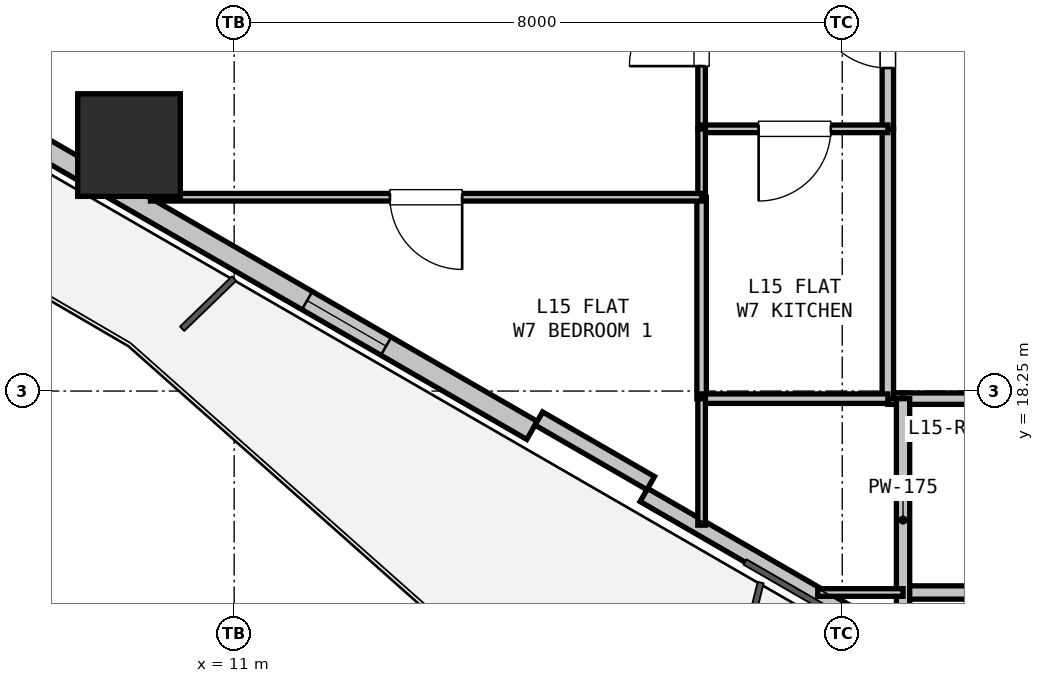
"""IFC4 building model, lengths in metres.
Left out: names, types, materials, properties, quantities, classifications, styles, units other than length and angle.
Written with IfcOpenShell. Run it as: python <this file> out.ifc"""

import sys

from ifc_helpers import new_model, si_unit, direction, frame, frame_2d, origin, origin_2d, place, context, subcontext, project, spatial, rectangle, hollow_rectangle, extrude, element, fill, save


model = new_model("IFC4")
c1 = context("Model", 3, precision=1e-05, world=origin(), true_north=direction((0.0, 1.0)))
c2 = subcontext(c1, "Body", "Model", "MODEL_VIEW")
j1 = project(units=[si_unit("LENGTHUNIT", "METRE"), si_unit("PLANEANGLEUNIT", "RADIAN")], contexts=[c1])
p1 = place(None, origin())
s1 = spatial("IfcSite", under=j1, at=p1, CompositionType="ELEMENT")
p2 = place(p1, origin())
s2 = spatial("IfcBuilding", under=s1, at=p2, CompositionType="ELEMENT")
p3 = place(p2, frame((0.0, 0.0, 55.5)))
s3 = spatial("IfcBuildingStorey", under=s2, at=p3, CompositionType="ELEMENT", Elevation=55.5)
p4 = place(p3, frame((9.617, 21.486, 0.0), z_axis=(0.0, 0.0, 1.0), x_axis=(1.0, 0.0, 0.0)))
e1 = element("IfcColumn", 1, at=p4, inside=s3, PredefinedType="COLUMN", context=c2, shape_type="SweptSolid", body=[
    extrude(hollow_rectangle(XDim=1.35, YDim=1.35, WallThickness=0.036, at=origin_2d()), origin(), (0.0, 0.0, 1.0), 3.3),
])
p5 = place(p3, frame((26.76, 10.896, 0.0), z_axis=(0.0, 0.0, 1.0), x_axis=(-0.866027351828, 0.499996625875, 0.0)))
e2 = element("IfcWall", 2, at=p5, inside=s3, PredefinedType="PARAPET", context=c2, shape_type="SweptSolid", body=[
    extrude(rectangle(XDim=11.973, YDim=0.2, at=frame_2d((5.987, 0.0))), origin(), (0.0, 0.0, 1.0), 0.2),
])
p6 = place(p3, frame((14.918, 17.733, 0.0), z_axis=(0.0, 0.0, 1.0), x_axis=(-0.866027105532, 0.499997052475, 0.0)))
e3 = element("IfcWall", 3, at=p6, inside=s3, PredefinedType="SOLIDWALL", context=c2, shape_type="SweptSolid", body=[
    extrude(rectangle(XDim=12.673, YDim=0.275, at=frame_2d((6.336, 0.0))), origin(), (0.0, 0.0, 1.0), 2.66),
])
p7 = place(p6, frame((2.216, 0.0, 0.9)))
e4 = element("IfcOpeningElement", 4, at=p7, cuts=e3, PredefinedType="OPENING", context=c2, shape_type="SweptSolid", body=[
    extrude(rectangle(XDim=1.2, YDim=1.4, at=frame_2d((0.6, 0.7))), frame((0.0, 0.147, 0.0), z_axis=(0.0, -1.0, 0.0), x_axis=(1.0, 0.0, 0.0)), (0.0, 0.0, 1.0), 0.295),
])
p8 = place(p3, frame((16.48, 17.039, 0.0), z_axis=(0.0, 0.0, 1.0), x_axis=(-0.86605165483, 0.499954529098, 0.0)))
e5 = element("IfcWall", 5, at=p8, inside=s3, PredefinedType="PARAPET", context=c2, shape_type="SweptSolid", body=[
    extrude(rectangle(XDim=1.7, YDim=0.2, at=frame_2d((0.85, 0.0))), origin(), (0.0, 0.0, 1.0), 2.66),
])
p9 = place(p3, frame((21.8, 18.15, 0.0), z_axis=(0.0, 0.0, 1.0), x_axis=(-1.0, 0.0, 0.0)))
e6 = element("IfcWall", 6, at=p9, inside=s3, PredefinedType="PARTITIONING", context=c2, shape_type="SweptSolid", body=[
    extrude(rectangle(XDim=2.0, YDim=0.15, at=frame_2d((1.0, 0.0))), origin(), (0.0, 0.0, 1.0), 3.04),
])
p10 = place(p3, frame((19.8, 18.15, 0.0), z_axis=(0.0, 0.0, 1.0), x_axis=(-1.0, 0.0, 0.0)))
e7 = element("IfcWall", 7, at=p10, inside=s3, PredefinedType="PARTITIONING", context=c2, shape_type="SweptSolid", body=[
    extrude(rectangle(XDim=0.2, YDim=0.15, at=frame_2d((0.1, 0.0))), origin(), (0.0, 0.0, 1.0), 3.04),
])
p11 = place(p3, frame((19.6, 18.15, 0.0), z_axis=(0.0, 0.0, 1.0), x_axis=(0.0, 1.0, 0.0)))
e8 = element("IfcWall", 8, at=p11, inside=s3, PredefinedType="PARTITIONING", context=c2, shape_type="SweptSolid", body=[
    extrude(rectangle(XDim=3.55, YDim=0.15, at=frame_2d((1.775, 0.0))), origin(), (0.0, 0.0, 1.0), 2.337),
])
p12 = place(p3, frame((19.6, 21.7, 0.0), z_axis=(0.0, 0.0, 1.0), x_axis=(0.0, 1.0, 0.0)))
e9 = element("IfcWall", 9, at=p12, inside=s3, PredefinedType="PARTITIONING", context=c2, shape_type="SweptSolid", body=[
    extrude(rectangle(XDim=2.6, YDim=0.15, at=frame_2d((1.3, 0.0))), origin(), (0.0, 0.0, 1.0), 3.04),
])
p13 = place(p12, frame((0.8, 0.0, 0.0)))
e10 = element("IfcOpeningElement", 10, at=p13, cuts=e9, PredefinedType="OPENING", context=c2, shape_type="SweptSolid", body=[
    extrude(rectangle(XDim=1.0, YDim=2.15, at=frame_2d((0.5, 1.075))), frame((0.0, 0.085, 0.0), z_axis=(0.0, -1.0, 0.0), x_axis=(1.0, 0.0, 0.0)), (0.0, 0.0, 1.0), 0.17),
])
p14 = place(p3, frame((17.15, 21.7, 0.0), z_axis=(0.0, 0.0, 1.0), x_axis=(0.0, 1.0, 0.0)))
e11 = element("IfcWall", 11, at=p14, inside=s3, PredefinedType="PARTITIONING", context=c2, shape_type="SweptSolid", body=[
    extrude(rectangle(XDim=2.6, YDim=0.1, at=frame_2d((1.3, 0.0))), origin(), (0.0, 0.0, 1.0), 3.04),
])
p15 = place(p14, frame((0.825, 0.0, 0.0)))
e12 = element("IfcOpeningElement", 12, at=p15, cuts=e11, PredefinedType="OPENING", context=c2, shape_type="SweptSolid", body=[
    extrude(rectangle(XDim=0.95, YDim=2.1, at=frame_2d((0.475, 1.05))), frame((0.0, 0.06, 0.0), z_axis=(0.0, -1.0, 0.0), x_axis=(1.0, 0.0, 0.0)), (0.0, 0.0, 1.0), 0.12),
])
p16 = place(p3, frame((19.6, 21.7, 0.0), z_axis=(0.0, 0.0, 1.0), x_axis=(-1.0, 0.0, 0.0)))
e13 = element("IfcWall", 13, at=p16, inside=s3, PredefinedType="PARTITIONING", context=c2, shape_type="SweptSolid", body=[
    extrude(rectangle(XDim=2.45, YDim=0.1, at=frame_2d((1.225, 0.0))), origin(), (0.0, 0.0, 1.0), 2.337),
])
p17 = place(p16, frame((0.75, 0.0, 0.0)))
e14 = element("IfcOpeningElement", 14, at=p17, cuts=e13, PredefinedType="OPENING", context=c2, shape_type="SweptSolid", body=[
    extrude(rectangle(XDim=0.95, YDim=2.1, at=frame_2d((0.475, 1.05))), frame((0.0, 0.06, 0.0), z_axis=(0.0, -1.0, 0.0), x_axis=(1.0, 0.0, 0.0)), (0.0, 0.0, 1.0), 0.12),
])
p18 = place(p3, frame((21.8, 15.6, 0.0), z_axis=(0.0, 0.0, 1.0), x_axis=(-1.0, 0.0, 0.0)))
e15 = element("IfcWall", 15, at=p18, inside=s3, PredefinedType="PLUMBINGWALL", context=c2, shape_type="SweptSolid", body=[
    extrude(rectangle(XDim=2.0, YDim=0.175, at=frame_2d((1.0, 0.0))), origin(), (0.0, 0.0, 1.0), 2.365),
])
p19 = place(p3, frame((19.8, 14.956, 0.0), z_axis=(0.0, 0.0, 1.0), x_axis=(0.0, 1.0, 0.0)))
e16 = element("IfcWall", 16, at=p19, inside=s3, PredefinedType="PLUMBINGWALL", context=c2, shape_type="SweptSolid", body=[
    extrude(rectangle(XDim=3.194, YDim=0.175, at=frame_2d((1.597, 0.0))), origin(), (0.0, 0.0, 1.0), 2.365),
])
p20 = place(p3, frame((17.15, 18.15, 0.0), z_axis=(0.0, 0.0, 1.0), x_axis=(0.0, 1.0, 0.0)))
e17 = element("IfcWall", 17, at=p20, inside=s3, PredefinedType="PARTITIONING", context=c2, shape_type="SweptSolid", body=[
    extrude(rectangle(XDim=2.65, YDim=0.125, at=frame_2d((1.325, 0.0))), origin(), (0.0, 0.0, 1.0), 3.04),
])
p21 = place(p3, frame((17.15, 20.8, 0.0), z_axis=(0.0, 0.0, 1.0), x_axis=(0.0, 1.0, 0.0)))
e18 = element("IfcWall", 18, at=p21, inside=s3, PredefinedType="PARTITIONING", context=c2, shape_type="SweptSolid", body=[
    extrude(rectangle(XDim=0.9, YDim=0.1, at=frame_2d((0.45, 0.0))), origin(), (0.0, 0.0, 1.0), 2.337),
])
p22 = place(p3, frame((19.6, 18.15, 0.0), z_axis=(0.0, 0.0, 1.0), x_axis=(-1.0, 0.0, 0.0)))
e19 = element("IfcWall", 19, at=p22, inside=s3, PredefinedType="PARTITIONING", context=c2, shape_type="SweptSolid", body=[
    extrude(rectangle(XDim=2.45, YDim=0.125, at=frame_2d((1.225, 0.0))), origin(), (0.0, 0.0, 1.0), 3.04),
])
p23 = place(p3, frame((18.678, 15.6, 0.0), z_axis=(0.0, 0.0, 1.0), x_axis=(1.0, 0.0, 0.0)))
e20 = element("IfcWall", 20, at=p23, inside=s3, PredefinedType="PARTITIONING", context=c2, shape_type="SweptSolid", body=[
    extrude(rectangle(XDim=1.122, YDim=0.1, at=frame_2d((0.561, 0.0))), origin(), (0.0, 0.0, 1.0), 2.365),
])
p24 = place(p3, frame((17.15, 20.8, 0.0), z_axis=(0.0, 0.0, 1.0), x_axis=(-1.0, 0.0, 0.0)))
e21 = element("IfcWall", 21, at=p24, inside=s3, PredefinedType="PARTITIONING", context=c2, shape_type="SweptSolid", body=[
    extrude(rectangle(XDim=7.25, YDim=0.1, at=frame_2d((3.625, 0.0))), origin(), (0.0, 0.0, 1.0), 2.365),
])
p25 = place(p24, frame((3.15, 0.0, 0.0)))
e22 = element("IfcOpeningElement", 22, at=p25, cuts=e21, PredefinedType="OPENING", context=c2, shape_type="SweptSolid", body=[
    extrude(rectangle(XDim=0.95, YDim=2.1, at=frame_2d((0.475, 1.05))), frame((0.0, 0.06, 0.0), z_axis=(0.0, -1.0, 0.0), x_axis=(1.0, 0.0, 0.0)), (0.0, 0.0, 1.0), 0.12),
])
p26 = place(p3, frame((17.15, 18.15, 0.0), z_axis=(0.0, 0.0, 1.0), x_axis=(0.0, -1.0, 0.0)))
e23 = element("IfcWall", 23, at=p26, inside=s3, PredefinedType="PARTITIONING", context=c2, shape_type="SweptSolid", body=[
    extrude(rectangle(XDim=1.664, YDim=0.1, at=frame_2d((0.832, 0.0))), origin(), (0.0, 0.0, 1.0), 2.365),
])
p27 = place(p7, origin())
e24 = element("IfcWindow", 24, at=p27, inside=s3, PartitioningType="SINGLE_PANEL", PredefinedType="WINDOW", context=c2, shape_type="SweptSolid", body=[
    extrude(rectangle(XDim=1.2, YDim=1.4, at=frame_2d((0.6, 0.7))), frame((0.0, 0.03, 0.0), z_axis=(0.0, -1.0, 0.0), x_axis=(1.0, 0.0, 0.0)), (0.0, 0.0, 1.0), 0.06),
])
fill(e4, e24)
p28 = place(p13, origin())
e25 = element("IfcDoor", 25, at=p28, inside=s3, OperationType="SINGLE_SWING_RIGHT", PredefinedType="DOOR", context=c2, shape_type="SweptSolid", body=[
    extrude(rectangle(XDim=1.0, YDim=2.15, at=frame_2d((0.5, 1.075))), frame((0.0, 0.025, 0.0), z_axis=(0.0, -1.0, 0.0), x_axis=(1.0, 0.0, 0.0)), (0.0, 0.0, 1.0), 0.05),
])
fill(e10, e25)
p29 = place(p17, origin())
e26 = element("IfcDoor", 26, at=p29, inside=s3, OperationType="SINGLE_SWING_RIGHT", PredefinedType="DOOR", context=c2, shape_type="SweptSolid", body=[
    extrude(rectangle(XDim=0.95, YDim=2.1, at=frame_2d((0.475, 1.05))), frame((0.0, 0.025, 0.0), z_axis=(0.0, -1.0, 0.0), x_axis=(1.0, 0.0, 0.0)), (0.0, 0.0, 1.0), 0.05),
])
fill(e14, e26)
p30 = place(p15, origin())
e27 = element("IfcDoor", 27, at=p30, inside=s3, OperationType="SINGLE_SWING_LEFT", PredefinedType="DOOR", context=c2, shape_type="SweptSolid", body=[
    extrude(rectangle(XDim=0.95, YDim=2.1, at=frame_2d((0.475, 1.05))), frame((0.0, 0.025, 0.0), z_axis=(0.0, -1.0, 0.0), x_axis=(1.0, 0.0, 0.0)), (0.0, 0.0, 1.0), 0.05),
])
fill(e12, e27)
p31 = place(p25, origin())
e28 = element("IfcDoor", 28, at=p31, inside=s3, OperationType="SINGLE_SWING_LEFT", PredefinedType="DOOR", context=c2, shape_type="SweptSolid", body=[
    extrude(rectangle(XDim=0.95, YDim=2.1, at=frame_2d((0.475, 1.05))), frame((0.0, 0.025, 0.0), z_axis=(0.0, -1.0, 0.0), x_axis=(1.0, 0.0, 0.0)), (0.0, 0.0, 1.0), 0.05),
])
fill(e22, e28)
save(model, sys.argv[1])
